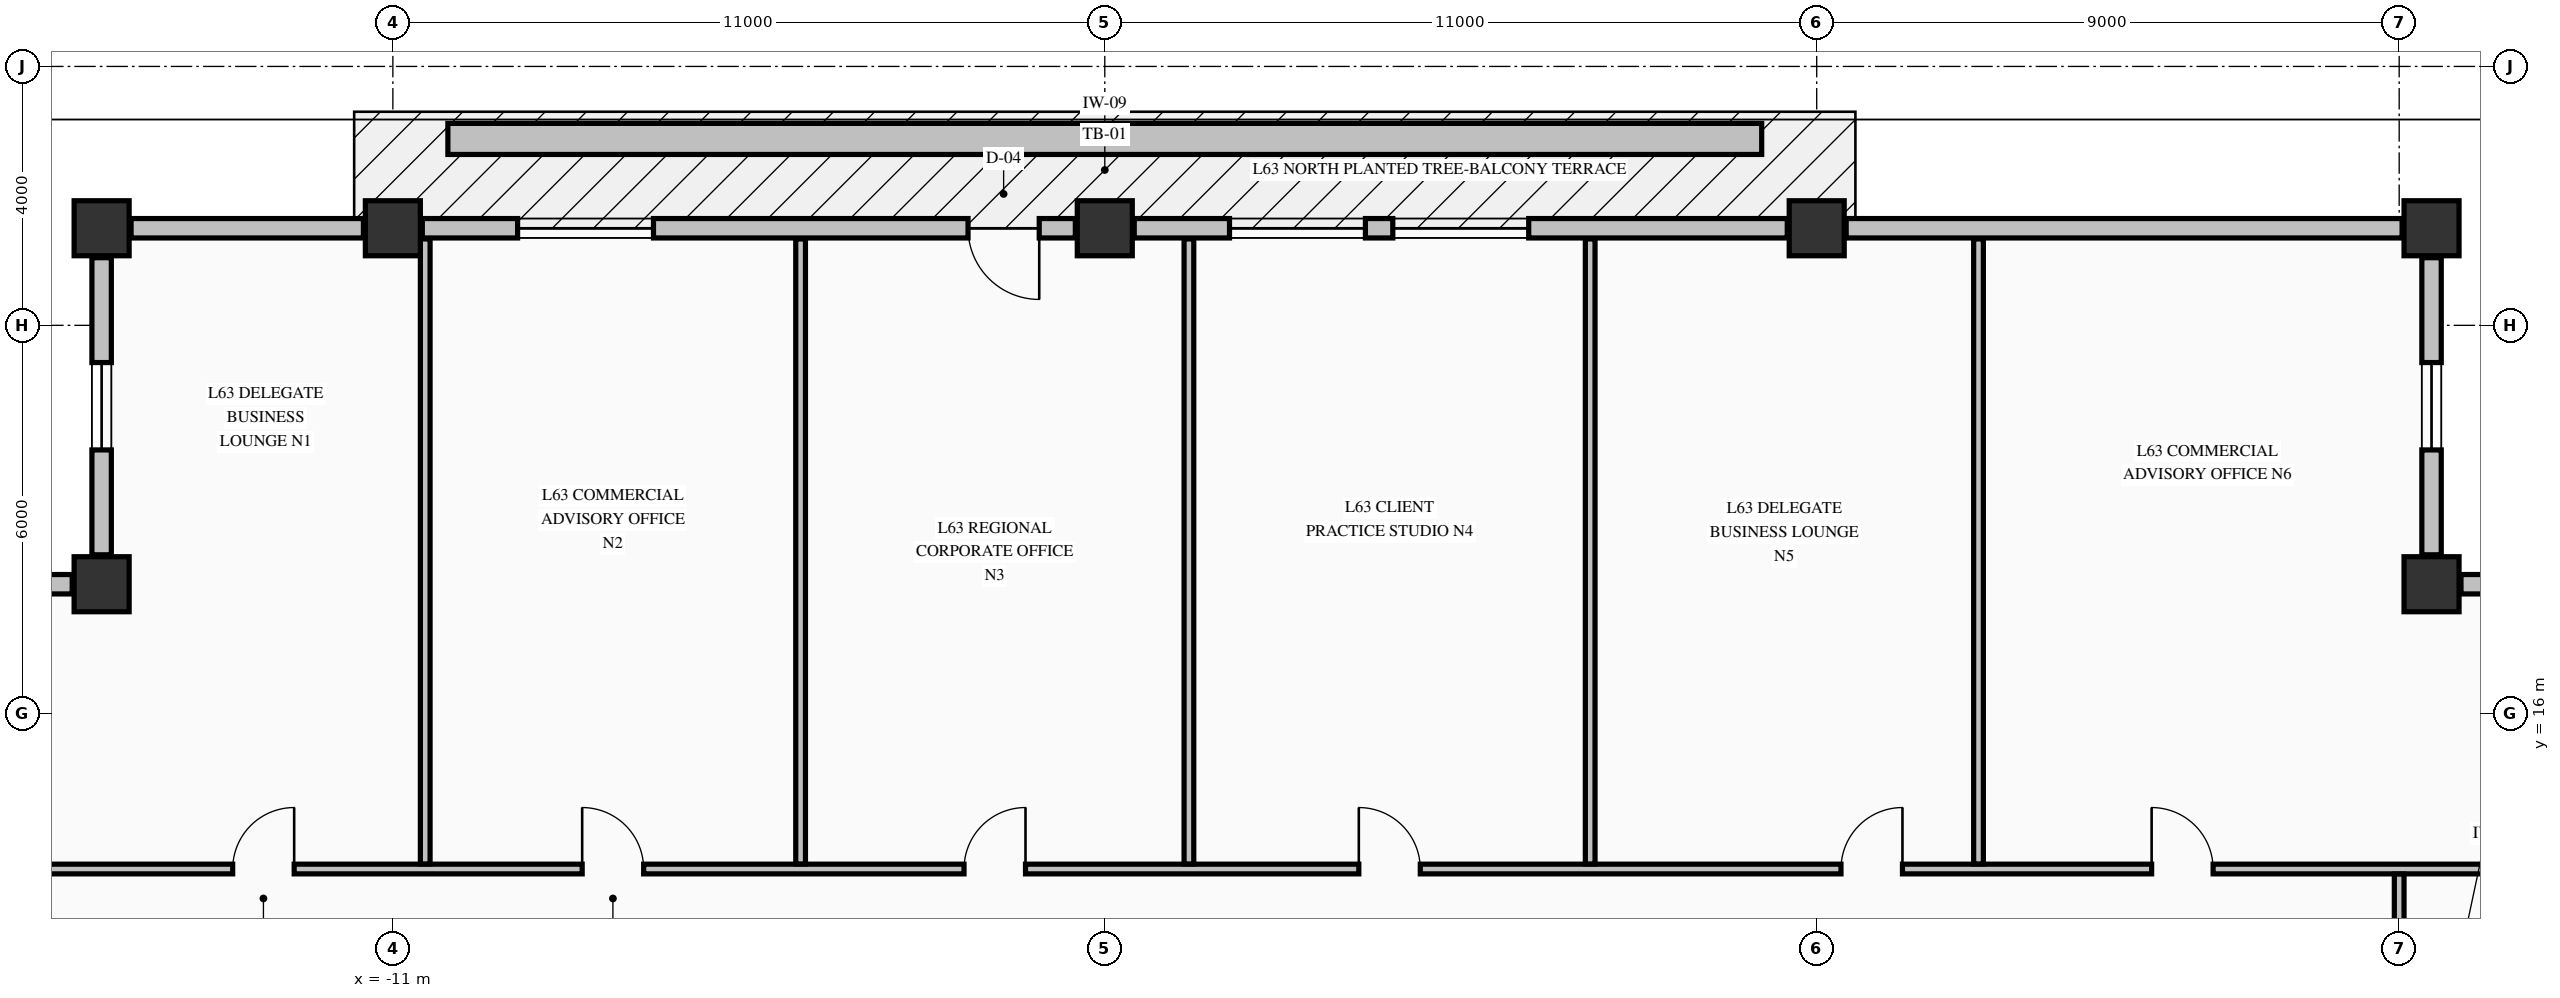
"""IFC4 building model, lengths in metres.
Left out: names, types, materials, properties, quantities, classifications, styles, units other than length and angle.
Written with IfcOpenShell. Run it as: python <this file> out.ifc"""

import sys

from ifc_helpers import new_model, si_unit, direction, frame, frame_2d, origin, origin_2d, place, context, subcontext, project, spatial, rectangle, extrude, element, fill, save


model = new_model("IFC4")
c1 = context("Model", 3, precision=1e-05, world=origin(), true_north=direction((0.0, 1.0)))
c2 = subcontext(c1, "Body", "Model", "MODEL_VIEW")
j1 = project(units=[si_unit("LENGTHUNIT", "METRE"), si_unit("PLANEANGLEUNIT", "RADIAN")], contexts=[c1])
p1 = place(None, origin())
s1 = spatial("IfcSite", under=j1, at=p1, CompositionType="ELEMENT")
p2 = place(p1, origin())
s2 = spatial("IfcBuilding", under=s1, at=p2, CompositionType="ELEMENT")
p3 = place(p2, frame((0.0, 0.0, 239.74)))
s3 = spatial("IfcBuildingStorey", under=s2, at=p3, CompositionType="ELEMENT", Elevation=239.74)
for number, where, z_axis, x_axis in (
    (1, (-15.5, 23.5, -0.25), (0.0, 0.0, 1.0), (1.0, 0.0, 0.0)),
    (2, (-11.0, 23.5, -0.25), (0.0, 0.0, 1.0), (1.0, 0.0, 0.0)),
    (3, (0.0, 23.5, -0.25), (0.0, 0.0, 1.0), (1.0, 0.0, 0.0)),
    (4, (11.0, 23.5, -0.25), (0.0, 0.0, 1.0), (1.0, 0.0, 0.0)),
    (5, (20.5, 23.5, -0.25), (0.0, 0.0, 1.0), (1.0, 0.0, 0.0)),
    (6, (20.5, 18.0, -0.25), (0.0, 0.0, 1.0), (1.0, 0.0, 0.0)),
    (7, (-15.5, 18.0, -0.25), (0.0, 0.0, 1.0), (1.0, 0.0, 0.0)),
):
    element("IfcColumn", number, at=place(p3, frame(where, z_axis=z_axis, x_axis=x_axis)), inside=s3, PredefinedType="COLUMN", context=c2, shape_type="SweptSolid", body=[
        extrude(rectangle(XDim=0.85, YDim=0.85, at=origin_2d()), origin(), (0.0, 0.0, 1.0), 3.23),
    ])
p4 = place(p3, frame((25.545, 18.0, 0.0), z_axis=(0.0, 0.0, 1.0), x_axis=(-1.0, 0.0, 0.0)))
e8 = element("IfcWall", 8, at=p4, inside=s3, PredefinedType="STANDARD", context=c2, shape_type="SweptSolid", body=[
    extrude(rectangle(XDim=4.59, YDim=0.3, at=frame_2d((2.295, 0.0))), origin(), (0.0, 0.0, 1.0), 2.372),
])
p5 = place(p4, frame((1.62, 0.0, 0.68)))
e9 = element("IfcOpeningElement", 9, at=p5, cuts=e8, PredefinedType="OPENING", context=c2, shape_type="SweptSolid", body=[
    extrude(rectangle(XDim=1.35, YDim=1.42, at=frame_2d((0.675, 0.71))), frame((0.0, 0.16, 0.0), z_axis=(0.0, -1.0, 0.0), x_axis=(1.0, 0.0, 0.0)), (0.0, 0.0, 1.0), 0.32),
])
p6 = place(p3, frame((20.5, 18.455, 0.0), z_axis=(0.0, 0.0, 1.0), x_axis=(0.0, 1.0, 0.0)))
e10 = element("IfcWall", 10, at=p6, inside=s3, PredefinedType="STANDARD", context=c2, shape_type="SweptSolid", body=[
    extrude(rectangle(XDim=4.59, YDim=0.3, at=frame_2d((2.295, 0.0))), origin(), (0.0, 0.0, 1.0), 2.372),
])
p7 = place(p6, frame((1.62, 0.0, 0.68)))
e11 = element("IfcOpeningElement", 11, at=p7, cuts=e10, PredefinedType="OPENING", context=c2, shape_type="SweptSolid", body=[
    extrude(rectangle(XDim=1.35, YDim=1.42, at=frame_2d((0.675, 0.71))), frame((0.0, 0.16, 0.0), z_axis=(0.0, -1.0, 0.0), x_axis=(1.0, 0.0, 0.0)), (0.0, 0.0, 1.0), 0.32),
])
p8 = place(p3, frame((-15.5, 23.045, 0.0), z_axis=(0.0, 0.0, 1.0), x_axis=(0.0, -1.0, 0.0)))
e12 = element("IfcWall", 12, at=p8, inside=s3, PredefinedType="STANDARD", context=c2, shape_type="SweptSolid", body=[
    extrude(rectangle(XDim=4.59, YDim=0.3, at=frame_2d((2.295, 0.0))), origin(), (0.0, 0.0, 1.0), 2.372),
])
p9 = place(p8, frame((1.62, 0.0, 0.68)))
e13 = element("IfcOpeningElement", 13, at=p9, cuts=e12, PredefinedType="OPENING", context=c2, shape_type="SweptSolid", body=[
    extrude(rectangle(XDim=1.35, YDim=1.42, at=frame_2d((0.675, 0.71))), frame((0.0, 0.16, 0.0), z_axis=(0.0, -1.0, 0.0), x_axis=(1.0, 0.0, 0.0)), (0.0, 0.0, 1.0), 0.32),
])
p10 = place(p3, frame((-15.955, 18.0, 0.0), z_axis=(0.0, 0.0, 1.0), x_axis=(-1.0, 0.0, 0.0)))
e14 = element("IfcWall", 14, at=p10, inside=s3, PredefinedType="STANDARD", context=c2, shape_type="SweptSolid", body=[
    extrude(rectangle(XDim=4.59, YDim=0.3, at=frame_2d((2.295, 0.0))), origin(), (0.0, 0.0, 1.0), 2.372),
])
p11 = place(p10, frame((1.62, 0.0, 0.68)))
e15 = element("IfcOpeningElement", 15, at=p11, cuts=e14, PredefinedType="OPENING", context=c2, shape_type="SweptSolid", body=[
    extrude(rectangle(XDim=1.35, YDim=1.42, at=frame_2d((0.675, 0.71))), frame((0.0, 0.16, 0.0), z_axis=(0.0, -1.0, 0.0), x_axis=(1.0, 0.0, 0.0)), (0.0, 0.0, 1.0), 0.32),
])
p12 = place(p3, frame((-11.455, 23.5, 0.0), z_axis=(0.0, 0.0, 1.0), x_axis=(-1.0, 0.0, 0.0)))
e16 = element("IfcWall", 16, at=p12, inside=s3, PredefinedType="STANDARD", context=c2, shape_type="SweptSolid", body=[
    extrude(rectangle(XDim=3.59, YDim=0.3, at=frame_2d((1.795, 0.0))), origin(), (0.0, 0.0, 1.0), 2.372),
])
p13 = place(p3, frame((-0.455, 23.5, 0.0), z_axis=(0.0, 0.0, 1.0), x_axis=(-1.0, 0.0, 0.0)))
e17 = element("IfcWall", 17, at=p13, inside=s3, PredefinedType="STANDARD", context=c2, shape_type="SweptSolid", body=[
    extrude(rectangle(XDim=10.09, YDim=0.3, at=frame_2d((5.045, 0.0))), origin(), (0.0, 0.0, 1.0), 2.372),
])
p14 = place(p13, frame((0.558, 0.0, 0.0)))
e18 = element("IfcOpeningElement", 18, at=p14, cuts=e17, PredefinedType="OPENING", context=c2, shape_type="SweptSolid", body=[
    extrude(rectangle(XDim=1.1, YDim=2.15, at=frame_2d((0.55, 1.075))), frame((0.0, 0.16, 0.0), z_axis=(0.0, -1.0, 0.0), x_axis=(1.0, 0.0, 0.0)), (0.0, 0.0, 1.0), 0.32),
])
p15 = place(p13, frame((6.518, 0.0, 0.7)))
e19 = element("IfcOpeningElement", 19, at=p15, cuts=e17, PredefinedType="OPENING", context=c2, shape_type="SweptSolid", body=[
    extrude(rectangle(XDim=2.1, YDim=1.5, at=frame_2d((1.05, 0.75))), frame((0.0, 0.16, 0.0), z_axis=(0.0, -1.0, 0.0), x_axis=(1.0, 0.0, 0.0)), (0.0, 0.0, 1.0), 0.32),
])
p16 = place(p3, frame((10.545, 23.5, 0.0), z_axis=(0.0, 0.0, 1.0), x_axis=(-1.0, 0.0, 0.0)))
e20 = element("IfcWall", 20, at=p16, inside=s3, PredefinedType="STANDARD", context=c2, shape_type="SweptSolid", body=[
    extrude(rectangle(XDim=10.09, YDim=0.3, at=frame_2d((5.045, 0.0))), origin(), (0.0, 0.0, 1.0), 2.372),
])
p17 = place(p16, frame((3.995, 0.0, 0.7)))
e21 = element("IfcOpeningElement", 21, at=p17, cuts=e20, PredefinedType="OPENING", context=c2, shape_type="SweptSolid", body=[
    extrude(rectangle(XDim=2.1, YDim=1.5, at=frame_2d((1.05, 0.75))), frame((0.0, 0.16, 0.0), z_axis=(0.0, -1.0, 0.0), x_axis=(1.0, 0.0, 0.0)), (0.0, 0.0, 1.0), 0.32),
])
p18 = place(p16, frame((6.518, 0.0, 0.7)))
e22 = element("IfcOpeningElement", 22, at=p18, cuts=e20, PredefinedType="OPENING", context=c2, shape_type="SweptSolid", body=[
    extrude(rectangle(XDim=2.1, YDim=1.5, at=frame_2d((1.05, 0.75))), frame((0.0, 0.16, 0.0), z_axis=(0.0, -1.0, 0.0), x_axis=(1.0, 0.0, 0.0)), (0.0, 0.0, 1.0), 0.32),
])
p19 = place(p3, frame((20.045, 23.5, 0.0), z_axis=(0.0, 0.0, 1.0), x_axis=(-1.0, 0.0, 0.0)))
e23 = element("IfcWall", 23, at=p19, inside=s3, PredefinedType="STANDARD", context=c2, shape_type="SweptSolid", body=[
    extrude(rectangle(XDim=8.59, YDim=0.3, at=frame_2d((4.295, 0.0))), origin(), (0.0, 0.0, 1.0), 2.372),
])
p20 = place(p3, frame((-20.075, 13.6, 0.0), z_axis=(0.0, 0.0, 1.0), x_axis=(1.0, 0.0, 0.0)))
e24 = element("IfcWall", 24, at=p20, inside=s3, PredefinedType="PARTITIONING", context=c2, shape_type="SweptSolid", body=[
    extrude(rectangle(XDim=45.91, YDim=0.15, at=frame_2d((22.955, 0.0))), origin(), (0.0, 0.0, 1.0), 2.98),
])
p21 = place(p20, frame((6.6, 0.0, 0.0)))
e25 = element("IfcOpeningElement", 25, at=p21, cuts=e24, PredefinedType="OPENING", context=c2, shape_type="SweptSolid", body=[
    extrude(rectangle(XDim=0.95, YDim=2.15, at=frame_2d((0.475, 1.075))), frame((0.0, 0.085, 0.0), z_axis=(0.0, -1.0, 0.0), x_axis=(1.0, 0.0, 0.0)), (0.0, 0.0, 1.0), 0.17),
])
p22 = place(p20, frame((12.0, 0.0, 0.0)))
e26 = element("IfcOpeningElement", 26, at=p22, cuts=e24, PredefinedType="OPENING", context=c2, shape_type="SweptSolid", body=[
    extrude(rectangle(XDim=0.95, YDim=2.15, at=frame_2d((0.475, 1.075))), frame((0.0, 0.085, 0.0), z_axis=(0.0, -1.0, 0.0), x_axis=(1.0, 0.0, 0.0)), (0.0, 0.0, 1.0), 0.17),
])
p23 = place(p20, frame((17.9, 0.0, 0.0)))
e27 = element("IfcOpeningElement", 27, at=p23, cuts=e24, PredefinedType="OPENING", context=c2, shape_type="SweptSolid", body=[
    extrude(rectangle(XDim=0.95, YDim=2.15, at=frame_2d((0.475, 1.075))), frame((0.0, 0.085, 0.0), z_axis=(0.0, -1.0, 0.0), x_axis=(1.0, 0.0, 0.0)), (0.0, 0.0, 1.0), 0.17),
])
p24 = place(p20, frame((24.0, 0.0, 0.0)))
e28 = element("IfcOpeningElement", 28, at=p24, cuts=e24, PredefinedType="OPENING", context=c2, shape_type="SweptSolid", body=[
    extrude(rectangle(XDim=0.95, YDim=2.15, at=frame_2d((0.475, 1.075))), frame((0.0, 0.085, 0.0), z_axis=(0.0, -1.0, 0.0), x_axis=(1.0, 0.0, 0.0)), (0.0, 0.0, 1.0), 0.17),
])
p25 = place(p20, frame((31.45, 0.0, 0.0)))
e29 = element("IfcOpeningElement", 29, at=p25, cuts=e24, PredefinedType="OPENING", context=c2, shape_type="SweptSolid", body=[
    extrude(rectangle(XDim=0.95, YDim=2.15, at=frame_2d((0.475, 1.075))), frame((0.0, 0.085, 0.0), z_axis=(0.0, -1.0, 0.0), x_axis=(1.0, 0.0, 0.0)), (0.0, 0.0, 1.0), 0.17),
])
p26 = place(p20, frame((36.25, 0.0, 0.0)))
e30 = element("IfcOpeningElement", 30, at=p26, cuts=e24, PredefinedType="OPENING", context=c2, shape_type="SweptSolid", body=[
    extrude(rectangle(XDim=0.95, YDim=2.15, at=frame_2d((0.475, 1.075))), frame((0.0, 0.085, 0.0), z_axis=(0.0, -1.0, 0.0), x_axis=(1.0, 0.0, 0.0)), (0.0, 0.0, 1.0), 0.17),
])
for number, where, z_axis, x_axis in (
    (31, (-10.5, 13.678, 0.0), (0.0, 0.0, 1.0), (0.0, 1.0, 0.0)),
    (32, (-4.7, 13.678, 0.0), (0.0, 0.0, 1.0), (0.0, 1.0, 0.0)),
    (33, (1.3, 13.678, 0.0), (0.0, 0.0, 1.0), (0.0, 1.0, 0.0)),
    (34, (7.5, 13.678, 0.0), (0.0, 0.0, 1.0), (0.0, 1.0, 0.0)),
    (35, (13.5, 13.678, 0.0), (0.0, 0.0, 1.0), (0.0, 1.0, 0.0)),
):
    element("IfcWall", number, at=place(p3, frame(where, z_axis=z_axis, x_axis=x_axis)), inside=s3, PredefinedType="PARTITIONING", context=c2, shape_type="SweptSolid", body=[
        extrude(rectangle(XDim=9.657, YDim=0.15, at=frame_2d((4.829, 0.0))), origin(), (0.0, 0.0, 1.0), 2.98),
    ])
p27 = place(p3, frame((20.0, 10.856, 0.0), z_axis=(0.0, 0.0, 1.0), x_axis=(0.0, 1.0, 0.0)))
e36 = element("IfcWall", 36, at=p27, inside=s3, PredefinedType="PARTITIONING", context=c2, shape_type="SweptSolid", body=[
    extrude(rectangle(XDim=2.666, YDim=0.15, at=frame_2d((1.333, 0.0))), origin(), (0.0, 0.0, 1.0), 2.98),
])
p28 = place(p27, frame((0.719, 0.0, 0.0)))
e37 = element("IfcOpeningElement", 37, at=p28, cuts=e36, PredefinedType="OPENING", context=c2, shape_type="SweptSolid", body=[
    extrude(rectangle(XDim=0.95, YDim=2.15, at=frame_2d((0.475, 1.075))), frame((0.0, 0.085, 0.0), z_axis=(0.0, -1.0, 0.0), x_axis=(1.0, 0.0, 0.0)), (0.0, 0.0, 1.0), 0.17),
])
p29 = place(p3, frame((-10.15, 24.88, -0.04), z_axis=(0.0, 0.0, 1.0), x_axis=(1.0, 0.0, 0.0)))
e38 = element("IfcWall", 38, at=p29, inside=s3, PredefinedType="PARAPET", context=c2, shape_type="SweptSolid", body=[
    extrude(rectangle(XDim=20.3, YDim=0.48, at=frame_2d((10.15, 0.0))), origin(), (0.0, 0.0, 1.0), 0.52),
])
p30 = place(p7, origin())
e39 = element("IfcWindow", 39, at=p30, inside=s3, PartitioningType="SINGLE_PANEL", PredefinedType="WINDOW", context=c2, shape_type="SweptSolid", body=[
    extrude(rectangle(XDim=1.35, YDim=1.42, at=frame_2d((0.675, 0.71))), frame((0.0, 0.03, 0.0), z_axis=(0.0, -1.0, 0.0), x_axis=(1.0, 0.0, 0.0)), (0.0, 0.0, 1.0), 0.06),
])
fill(e11, e39)
p31 = place(p9, origin())
e40 = element("IfcWindow", 40, at=p31, inside=s3, PartitioningType="SINGLE_PANEL", PredefinedType="WINDOW", context=c2, shape_type="SweptSolid", body=[
    extrude(rectangle(XDim=1.35, YDim=1.42, at=frame_2d((0.675, 0.71))), frame((0.0, 0.03, 0.0), z_axis=(0.0, -1.0, 0.0), x_axis=(1.0, 0.0, 0.0)), (0.0, 0.0, 1.0), 0.06),
])
fill(e13, e40)
p32 = place(p14, origin())
e41 = element("IfcDoor", 41, at=p32, inside=s3, OperationType="SINGLE_SWING_LEFT", PredefinedType="DOOR", context=c2, shape_type="SweptSolid", body=[
    extrude(rectangle(XDim=1.1, YDim=2.15, at=frame_2d((0.55, 1.075))), frame((0.0, 0.025, 0.0), z_axis=(0.0, -1.0, 0.0), x_axis=(1.0, 0.0, 0.0)), (0.0, 0.0, 1.0), 0.05),
])
fill(e18, e41)
p33 = place(p15, origin())
e42 = element("IfcWindow", 42, at=p33, inside=s3, PartitioningType="SINGLE_PANEL", PredefinedType="WINDOW", context=c2, shape_type="SweptSolid", body=[
    extrude(rectangle(XDim=2.1, YDim=1.5, at=frame_2d((1.05, 0.75))), frame((0.0, 0.03, 0.0), z_axis=(0.0, -1.0, 0.0), x_axis=(1.0, 0.0, 0.0)), (0.0, 0.0, 1.0), 0.06),
])
fill(e19, e42)
p34 = place(p17, origin())
e43 = element("IfcWindow", 43, at=p34, inside=s3, PartitioningType="SINGLE_PANEL", PredefinedType="WINDOW", context=c2, shape_type="SweptSolid", body=[
    extrude(rectangle(XDim=2.1, YDim=1.5, at=frame_2d((1.05, 0.75))), frame((0.0, 0.03, 0.0), z_axis=(0.0, -1.0, 0.0), x_axis=(1.0, 0.0, 0.0)), (0.0, 0.0, 1.0), 0.06),
])
fill(e21, e43)
p35 = place(p18, origin())
e44 = element("IfcWindow", 44, at=p35, inside=s3, PartitioningType="SINGLE_PANEL", PredefinedType="WINDOW", context=c2, shape_type="SweptSolid", body=[
    extrude(rectangle(XDim=2.1, YDim=1.5, at=frame_2d((1.05, 0.75))), frame((0.0, 0.03, 0.0), z_axis=(0.0, -1.0, 0.0), x_axis=(1.0, 0.0, 0.0)), (0.0, 0.0, 1.0), 0.06),
])
fill(e22, e44)
p36 = place(p21, origin())
e45 = element("IfcDoor", 45, at=p36, inside=s3, OperationType="SINGLE_SWING_RIGHT", PredefinedType="DOOR", context=c2, shape_type="SweptSolid", body=[
    extrude(rectangle(XDim=0.95, YDim=2.15, at=frame_2d((0.475, 1.075))), frame((0.0, 0.025, 0.0), z_axis=(0.0, -1.0, 0.0), x_axis=(1.0, 0.0, 0.0)), (0.0, 0.0, 1.0), 0.05),
])
fill(e25, e45)
p37 = place(p22, origin())
e46 = element("IfcDoor", 46, at=p37, inside=s3, OperationType="SINGLE_SWING_LEFT", PredefinedType="DOOR", context=c2, shape_type="SweptSolid", body=[
    extrude(rectangle(XDim=0.95, YDim=2.15, at=frame_2d((0.475, 1.075))), frame((0.0, 0.025, 0.0), z_axis=(0.0, -1.0, 0.0), x_axis=(1.0, 0.0, 0.0)), (0.0, 0.0, 1.0), 0.05),
])
fill(e26, e46)
p38 = place(p23, origin())
e47 = element("IfcDoor", 47, at=p38, inside=s3, OperationType="SINGLE_SWING_RIGHT", PredefinedType="DOOR", context=c2, shape_type="SweptSolid", body=[
    extrude(rectangle(XDim=0.95, YDim=2.15, at=frame_2d((0.475, 1.075))), frame((0.0, 0.025, 0.0), z_axis=(0.0, -1.0, 0.0), x_axis=(1.0, 0.0, 0.0)), (0.0, 0.0, 1.0), 0.05),
])
fill(e27, e47)
p39 = place(p24, origin())
e48 = element("IfcDoor", 48, at=p39, inside=s3, OperationType="SINGLE_SWING_LEFT", PredefinedType="DOOR", context=c2, shape_type="SweptSolid", body=[
    extrude(rectangle(XDim=0.95, YDim=2.15, at=frame_2d((0.475, 1.075))), frame((0.0, 0.025, 0.0), z_axis=(0.0, -1.0, 0.0), x_axis=(1.0, 0.0, 0.0)), (0.0, 0.0, 1.0), 0.05),
])
fill(e28, e48)
p40 = place(p25, origin())
e49 = element("IfcDoor", 49, at=p40, inside=s3, OperationType="SINGLE_SWING_RIGHT", PredefinedType="DOOR", context=c2, shape_type="SweptSolid", body=[
    extrude(rectangle(XDim=0.95, YDim=2.15, at=frame_2d((0.475, 1.075))), frame((0.0, 0.025, 0.0), z_axis=(0.0, -1.0, 0.0), x_axis=(1.0, 0.0, 0.0)), (0.0, 0.0, 1.0), 0.05),
])
fill(e29, e49)
p41 = place(p26, origin())
e50 = element("IfcDoor", 50, at=p41, inside=s3, OperationType="SINGLE_SWING_LEFT", PredefinedType="DOOR", context=c2, shape_type="SweptSolid", body=[
    extrude(rectangle(XDim=0.95, YDim=2.15, at=frame_2d((0.475, 1.075))), frame((0.0, 0.025, 0.0), z_axis=(0.0, -1.0, 0.0), x_axis=(1.0, 0.0, 0.0)), (0.0, 0.0, 1.0), 0.05),
])
fill(e30, e50)
save(model, sys.argv[1])
